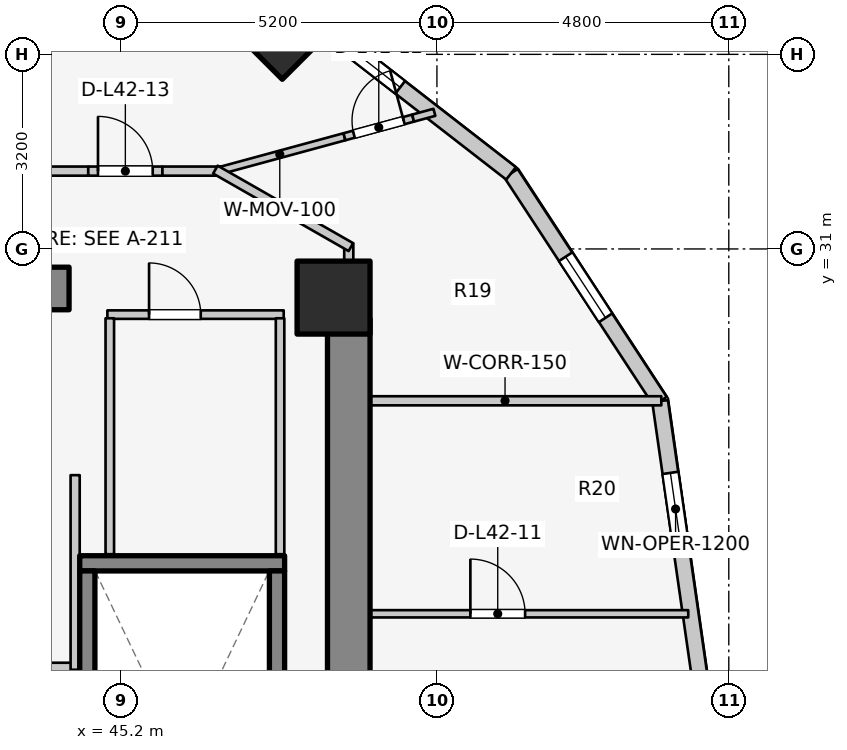
"""IFC4 building model, lengths in metres.
Left out: names, types, materials, properties, quantities, classifications, styles, units other than length and angle.
Written with IfcOpenShell. Run it as: python <this file> out.ifc"""

import sys

from ifc_helpers import new_model, si_unit, direction, frame, frame_2d, origin, origin_2d, place, context, subcontext, project, spatial, rectangle, extrude, element, fill, save


model = new_model("IFC4")
c1 = context("Model", 3, precision=1e-05, world=origin(), true_north=direction((0.0, 1.0)))
c2 = subcontext(c1, "Body", "Model", "MODEL_VIEW")
j1 = project(units=[si_unit("LENGTHUNIT", "METRE"), si_unit("PLANEANGLEUNIT", "RADIAN")], contexts=[c1])
p1 = place(None, origin())
s1 = spatial("IfcSite", under=j1, at=p1, CompositionType="ELEMENT")
p2 = place(p1, origin())
s2 = spatial("IfcBuilding", under=s1, at=p2, CompositionType="ELEMENT")
p3 = place(p2, frame((0.0, 0.0, 140.5)))
s3 = spatial("IfcBuildingStorey", under=s2, at=p3, CompositionType="ELEMENT", Elevation=140.5)
p4 = place(p3, frame((48.95, 17.05, 0.0), z_axis=(0.0, 0.0, 1.0), x_axis=(0.0, 1.0, 0.0)))
e1 = element("IfcWall", 1, at=p4, inside=s3, PredefinedType="SHEAR", context=c2, shape_type="SweptSolid", body=[
    extrude(rectangle(XDim=12.8, YDim=0.7, at=frame_2d((6.4, 0.0))), origin(), (0.0, 0.0, 1.0), 3.1),
])
p5 = place(p3, frame((39.85, 30.35, 0.0), z_axis=(0.0, 0.0, 1.0), x_axis=(1.0, 0.0, 0.0)))
e2 = element("IfcWall", 2, at=p5, inside=s3, PredefinedType="SHEAR", context=c2, shape_type="SweptSolid", body=[
    extrude(rectangle(XDim=4.5, YDim=0.7, at=frame_2d((2.25, 0.0))), origin(), (0.0, 0.0, 1.0), 3.1),
])
p6 = place(p3, frame((44.525, 25.83, 0.0), z_axis=(0.0, 0.0, 1.0), x_axis=(1.0, 0.0, 0.0)))
e3 = element("IfcWall", 3, at=p6, inside=s3, PredefinedType="SOLIDWALL", context=c2, shape_type="SweptSolid", body=[
    extrude(rectangle(XDim=3.37, YDim=0.25, at=frame_2d((1.685, 0.0))), origin(), (0.0, 0.0, 1.0), 3.1),
])
for number, where, z_axis, x_axis in (
    (4, (44.65, 17.895, 0.0), (0.0, 0.0, 1.0), (0.0, 1.0, 0.0)),
    (5, (47.77, 17.895, 0.0), (0.0, 0.0, 1.0), (0.0, 1.0, 0.0)),
):
    element("IfcWall", number, at=place(p3, frame(where, z_axis=z_axis, x_axis=x_axis)), inside=s3, PredefinedType="SOLIDWALL", context=c2, shape_type="SweptSolid", body=[
        extrude(rectangle(XDim=7.81, YDim=0.25, at=frame_2d((3.905, 0.0))), origin(), (0.0, 0.0, 1.0), 3.1),
    ])
p7 = place(p3, frame((48.7, 30.2, 0.0), z_axis=(0.0, 0.0, 1.0), x_axis=(1.0, 0.0, 0.0)))
e6 = element("IfcColumn", 6, at=p7, inside=s3, PredefinedType="COLUMN", context=c2, shape_type="SweptSolid", body=[
    extrude(rectangle(XDim=1.2, YDim=1.2, at=origin_2d()), origin(), (0.0, 0.0, 1.0), 3.1),
])
p8 = place(p3, frame((47.857, 34.427, 0.0), z_axis=(0.0, 0.0, 1.0), x_axis=(0.707106781187, 0.707106781187, 0.0)))
e7 = element("IfcColumn", 7, at=p8, inside=s3, PredefinedType="COLUMN", context=c2, shape_type="SweptSolid", body=[
    extrude(rectangle(XDim=0.9, YDim=0.9, at=origin_2d()), origin(), (0.0, 0.0, 1.0), 3.1),
])
p9 = place(p3, frame((54.86, 23.0, 0.0), z_axis=(0.0, 0.0, 1.0), x_axis=(-0.142227632286, 0.989833976288, 0.0)))
e8 = element("IfcWall", 8, at=p9, inside=s3, PredefinedType="STANDARD", context=c2, shape_type="SweptSolid", body=[
    extrude(rectangle(XDim=5.553, YDim=0.26, at=frame_2d((2.776, 0.0))), origin(), (0.0, 0.0, 1.0), 2.57),
])
p10 = place(p9, frame((3.162, 0.0, 0.75)))
e9 = element("IfcOpeningElement", 9, at=p10, cuts=e8, PredefinedType="OPENING", context=c2, shape_type="SweptSolid", body=[
    extrude(rectangle(XDim=1.2, YDim=1.5, at=frame_2d((0.6, 0.75))), frame((0.0, 0.14, 0.0), z_axis=(0.0, -1.0, 0.0), x_axis=(1.0, 0.0, 0.0)), (0.0, 0.0, 1.0), 0.28),
])
p11 = place(p3, frame((54.07, 28.497, 0.0), z_axis=(0.0, 0.0, 1.0), x_axis=(-0.547456494366, 0.836834145322, 0.0)))
e10 = element("IfcWall", 10, at=p11, inside=s3, PredefinedType="STANDARD", context=c2, shape_type="SweptSolid", body=[
    extrude(rectangle(XDim=4.477, YDim=0.26, at=frame_2d((2.239, 0.0))), origin(), (0.0, 0.0, 1.0), 1.22),
])
p12 = place(p11, frame((1.639, 0.0, 0.15)))
e11 = element("IfcOpeningElement", 11, at=p12, cuts=e10, PredefinedType="OPENING", context=c2, shape_type="SweptSolid", body=[
    extrude(rectangle(XDim=1.2, YDim=0.9, at=frame_2d((0.6, 0.45))), frame((0.0, 0.14, 0.0), z_axis=(0.0, -1.0, 0.0), x_axis=(1.0, 0.0, 0.0)), (0.0, 0.0, 1.0), 0.28),
])
p13 = place(p3, frame((51.619, 32.243, 0.0), z_axis=(0.0, 0.0, 1.0), x_axis=(-0.790185650662, 0.612867552973, 0.0)))
e12 = element("IfcWall", 12, at=p13, inside=s3, PredefinedType="STANDARD", context=c2, shape_type="SweptSolid", body=[
    extrude(rectangle(XDim=4.239, YDim=0.26, at=frame_2d((2.12, 0.0))), origin(), (0.0, 0.0, 1.0), 1.22),
])
p14 = place(p13, frame((2.308, 0.0, 0.15)))
e13 = element("IfcOpeningElement", 13, at=p14, cuts=e12, PredefinedType="OPENING", context=c2, shape_type="SweptSolid", body=[
    extrude(rectangle(XDim=1.2, YDim=0.9, at=frame_2d((0.6, 0.45))), frame((0.0, 0.14, 0.0), z_axis=(0.0, -1.0, 0.0), x_axis=(1.0, 0.0, 0.0)), (0.0, 0.0, 1.0), 0.28),
])
p15 = place(p3, frame((39.4, 24.12, 0.0), z_axis=(0.0, 0.0, 1.0), x_axis=(1.0, 0.0, 0.0)))
e14 = element("IfcWall", 14, at=p15, inside=s3, PredefinedType="PARTITIONING", context=c2, shape_type="SweptSolid", body=[
    extrude(rectangle(XDim=5.08, YDim=0.15, at=frame_2d((2.54, 0.0))), origin(), (0.0, 0.0, 1.0), 2.12),
])
p16 = place(p3, frame((44.45, 24.08, 0.0), z_axis=(0.0, 0.0, 1.0), x_axis=(0.0, 1.0, 0.0)))
e15 = element("IfcWall", 15, at=p16, inside=s3, PredefinedType="PARTITIONING", context=c2, shape_type="SweptSolid", body=[
    extrude(rectangle(XDim=3.2, YDim=0.15, at=frame_2d((1.6, 0.0))), origin(), (0.0, 0.0, 1.0), 2.575),
])
p17 = place(p3, frame((44.98, 29.92, 0.0), z_axis=(0.0, 0.0, 1.0), x_axis=(1.0, 0.0, 0.0)))
e16 = element("IfcWall", 16, at=p17, inside=s3, PredefinedType="PLUMBINGWALL", context=c2, shape_type="SweptSolid", body=[
    extrude(rectangle(XDim=2.9, YDim=0.14, at=frame_2d((1.45, 0.0))), origin(), (0.0, 0.0, 1.0), 2.575),
])
p18 = place(p17, frame((0.686, 0.0, 0.0)))
e17 = element("IfcOpeningElement", 17, at=p18, cuts=e16, PredefinedType="OPENING", context=c2, shape_type="SweptSolid", body=[
    extrude(rectangle(XDim=0.85, YDim=2.05, at=frame_2d((0.425, 1.025))), frame((0.0, 0.08, 0.0), z_axis=(0.0, -1.0, 0.0), x_axis=(1.0, 0.0, 0.0)), (0.0, 0.0, 1.0), 0.16),
])
for number, where, z_axis, x_axis in (
    (18, (45.02, 25.98, 0.0), (0.0, 0.0, 1.0), (0.0, 1.0, 0.0)),
    (19, (47.82, 25.98, 0.0), (0.0, 0.0, 1.0), (0.0, 1.0, 0.0)),
):
    element("IfcWall", number, at=place(p3, frame(where, z_axis=z_axis, x_axis=x_axis)), inside=s3, PredefinedType="PLUMBINGWALL", context=c2, shape_type="SweptSolid", body=[
        extrude(rectangle(XDim=3.88, YDim=0.14, at=frame_2d((1.94, 0.0))), origin(), (0.0, 0.0, 1.0), 2.575),
    ])
p19 = place(p3, frame((48.95, 28.503, 0.0), z_axis=(0.0, 0.0, 1.0), x_axis=(1.0, 0.0, 0.0)))
e20 = element("IfcWall", 20, at=p19, inside=s3, PredefinedType="PARTITIONING", context=c2, shape_type="SweptSolid", body=[
    extrude(rectangle(XDim=5.14, YDim=0.15, at=frame_2d((2.57, 0.0))), origin(), (0.0, 0.0, 1.0), 2.575),
])
p20 = place(p3, frame((48.95, 25.0, 0.0), z_axis=(0.0, 0.0, 1.0), x_axis=(1.0, 0.0, 0.0)))
e21 = element("IfcWall", 21, at=p20, inside=s3, PredefinedType="MOVABLE", context=c2, shape_type="SweptSolid", body=[
    extrude(rectangle(XDim=5.583, YDim=0.12, at=frame_2d((2.792, 0.0))), origin(), (0.0, 0.0, 1.0), 2.575),
])
p21 = place(p20, frame((2.0, 0.0, 0.0)))
e22 = element("IfcOpeningElement", 22, at=p21, cuts=e21, PredefinedType="OPENING", context=c2, shape_type="SweptSolid", body=[
    extrude(rectangle(XDim=0.9, YDim=2.1, at=frame_2d((0.45, 1.05))), frame((0.0, 0.07, 0.0), z_axis=(0.0, -1.0, 0.0), x_axis=(1.0, 0.0, 0.0)), (0.0, 0.0, 1.0), 0.14),
])
p22 = place(p3, frame((48.95, 29.8, 0.0), z_axis=(0.0, 0.0, 1.0), x_axis=(0.0, 1.0, 0.0)))
e23 = element("IfcWall", 23, at=p22, inside=s3, PredefinedType="PARTITIONING", context=c2, shape_type="SweptSolid", body=[
    extrude(rectangle(XDim=1.29, YDim=0.15, at=frame_2d((0.645, 0.0))), origin(), (0.0, 0.0, 1.0), 1.22),
])
p23 = place(p3, frame((46.752, 32.267, 0.0), z_axis=(0.0, 0.0, 1.0), x_axis=(0.964996026859, 0.262264500356, 0.0)))
e24 = element("IfcWall", 24, at=p23, inside=s3, PredefinedType="MOVABLE", context=c2, shape_type="SweptSolid", body=[
    extrude(rectangle(XDim=2.204, YDim=0.12, at=frame_2d((1.102, 0.0))), origin(), (0.0, 0.0, 1.0), 1.22),
])
p24 = place(p3, frame((48.879, 32.845, 0.0), z_axis=(0.0, 0.0, 1.0), x_axis=(0.964994566257, 0.262269874548, 0.0)))
e25 = element("IfcWall", 25, at=p24, inside=s3, PredefinedType="MOVABLE", context=c2, shape_type="SweptSolid", body=[
    extrude(rectangle(XDim=1.17, YDim=0.12, at=frame_2d((0.585, 0.0))), origin(), (0.0, 0.0, 1.0), 2.575),
])
p25 = place(p24, frame((0.16, 0.0, 0.0)))
e26 = element("IfcOpeningElement", 26, at=p25, cuts=e25, PredefinedType="OPENING", context=c2, shape_type="SweptSolid", body=[
    extrude(rectangle(XDim=0.85, YDim=2.05, at=frame_2d((0.425, 1.025))), frame((0.0, 0.07, 0.0), z_axis=(0.0, -1.0, 0.0), x_axis=(1.0, 0.0, 0.0)), (0.0, 0.0, 1.0), 0.14),
])
p26 = place(p3, frame((50.008, 33.152, 0.0), z_axis=(0.0, 0.0, 1.0), x_axis=(0.964996222189, 0.26226378164, 0.0)))
e27 = element("IfcWall", 27, at=p26, inside=s3, PredefinedType="MOVABLE", context=c2, shape_type="SweptSolid", body=[
    extrude(rectangle(XDim=0.363, YDim=0.12, at=frame_2d((0.182, 0.0))), origin(), (0.0, 0.0, 1.0), 2.575),
])
p27 = place(p3, frame((39.33, 32.28, 0.0), z_axis=(0.0, 0.0, 1.0), x_axis=(1.0, 0.0, 0.0)))
e28 = element("IfcWall", 28, at=p27, inside=s3, PredefinedType="PARTITIONING", context=c2, shape_type="SweptSolid", body=[
    extrude(rectangle(XDim=5.336, YDim=0.15, at=frame_2d((2.668, 0.0))), origin(), (0.0, 0.0, 1.0), 1.22),
])
p28 = place(p3, frame((44.666, 32.28, 0.0), z_axis=(0.0, 0.0, 1.0), x_axis=(1.0, 0.0, 0.0)))
e29 = element("IfcWall", 29, at=p28, inside=s3, PredefinedType="PARTITIONING", context=c2, shape_type="SweptSolid", body=[
    extrude(rectangle(XDim=1.22, YDim=0.15, at=frame_2d((0.61, 0.0))), origin(), (0.0, 0.0, 1.0), 2.16),
])
p29 = place(p28, frame((0.16, 0.0, 0.0)))
e30 = element("IfcOpeningElement", 30, at=p29, cuts=e29, PredefinedType="OPENING", context=c2, shape_type="SweptSolid", body=[
    extrude(rectangle(XDim=0.9, YDim=2.1, at=frame_2d((0.45, 1.05))), frame((0.0, 0.085, 0.0), z_axis=(0.0, -1.0, 0.0), x_axis=(1.0, 0.0, 0.0)), (0.0, 0.0, 1.0), 0.17),
])
p30 = place(p3, frame((45.886, 32.28, 0.0), z_axis=(0.0, 0.0, 1.0), x_axis=(1.0, 0.0, 0.0)))
e31 = element("IfcWall", 31, at=p30, inside=s3, PredefinedType="PARTITIONING", context=c2, shape_type="SweptSolid", body=[
    extrude(rectangle(XDim=0.964, YDim=0.15, at=frame_2d((0.482, 0.0))), origin(), (0.0, 0.0, 1.0), 2.575),
])
p31 = place(p3, frame((46.757, 32.305, 0.0), z_axis=(0.0, 0.0, 1.0), x_axis=(0.867991349648, -0.496579315857, 0.0)))
e32 = element("IfcWall", 32, at=p31, inside=s3, PredefinedType="PARTITIONING", context=c2, shape_type="SweptSolid", body=[
    extrude(rectangle(XDim=2.567, YDim=0.15, at=frame_2d((1.283, 0.0))), origin(), (0.0, 0.0, 1.0), 1.22),
])
p32 = place(p10, origin())
e33 = element("IfcWindow", 33, at=p32, inside=s3, PartitioningType="SINGLE_PANEL", PredefinedType="WINDOW", context=c2, shape_type="SweptSolid", body=[
    extrude(rectangle(XDim=1.2, YDim=1.5, at=frame_2d((0.6, 0.75))), frame((0.0, 0.03, 0.0), z_axis=(0.0, -1.0, 0.0), x_axis=(1.0, 0.0, 0.0)), (0.0, 0.0, 1.0), 0.06),
])
fill(e9, e33)
p33 = place(p12, origin())
e34 = element("IfcWindow", 34, at=p33, inside=s3, PartitioningType="SINGLE_PANEL", PredefinedType="WINDOW", context=c2, shape_type="SweptSolid", body=[
    extrude(rectangle(XDim=1.2, YDim=0.9, at=frame_2d((0.6, 0.45))), frame((0.0, 0.03, 0.0), z_axis=(0.0, -1.0, 0.0), x_axis=(1.0, 0.0, 0.0)), (0.0, 0.0, 1.0), 0.06),
])
fill(e11, e34)
p34 = place(p14, origin())
e35 = element("IfcWindow", 35, at=p34, inside=s3, PartitioningType="SINGLE_PANEL", PredefinedType="WINDOW", context=c2, shape_type="SweptSolid", body=[
    extrude(rectangle(XDim=1.2, YDim=0.9, at=frame_2d((0.6, 0.45))), frame((0.0, 0.03, 0.0), z_axis=(0.0, -1.0, 0.0), x_axis=(1.0, 0.0, 0.0)), (0.0, 0.0, 1.0), 0.06),
])
fill(e13, e35)
p35 = place(p18, origin())
e36 = element("IfcDoor", 36, at=p35, inside=s3, OperationType="SINGLE_SWING_LEFT", PredefinedType="DOOR", context=c2, shape_type="SweptSolid", body=[
    extrude(rectangle(XDim=0.85, YDim=2.05, at=frame_2d((0.425, 1.025))), frame((0.0, 0.025, 0.0), z_axis=(0.0, -1.0, 0.0), x_axis=(1.0, 0.0, 0.0)), (0.0, 0.0, 1.0), 0.05),
])
fill(e17, e36)
p36 = place(p21, origin())
e37 = element("IfcDoor", 37, at=p36, inside=s3, OperationType="SINGLE_SWING_LEFT", PredefinedType="DOOR", context=c2, shape_type="SweptSolid", body=[
    extrude(rectangle(XDim=0.9, YDim=2.1, at=frame_2d((0.45, 1.05))), frame((0.0, 0.025, 0.0), z_axis=(0.0, -1.0, 0.0), x_axis=(1.0, 0.0, 0.0)), (0.0, 0.0, 1.0), 0.05),
])
fill(e22, e37)
p37 = place(p25, origin())
e38 = element("IfcDoor", 38, at=p37, inside=s3, OperationType="SINGLE_SWING_RIGHT", PredefinedType="DOOR", context=c2, shape_type="SweptSolid", body=[
    extrude(rectangle(XDim=0.85, YDim=2.05, at=frame_2d((0.425, 1.025))), frame((0.0, 0.025, 0.0), z_axis=(0.0, -1.0, 0.0), x_axis=(1.0, 0.0, 0.0)), (0.0, 0.0, 1.0), 0.05),
])
fill(e26, e38)
p38 = place(p29, origin())
e39 = element("IfcDoor", 39, at=p38, inside=s3, OperationType="SINGLE_SWING_LEFT", PredefinedType="DOOR", context=c2, shape_type="SweptSolid", body=[
    extrude(rectangle(XDim=0.9, YDim=2.1, at=frame_2d((0.45, 1.05))), frame((0.0, 0.025, 0.0), z_axis=(0.0, -1.0, 0.0), x_axis=(1.0, 0.0, 0.0)), (0.0, 0.0, 1.0), 0.05),
])
fill(e30, e39)
save(model, sys.argv[1])
